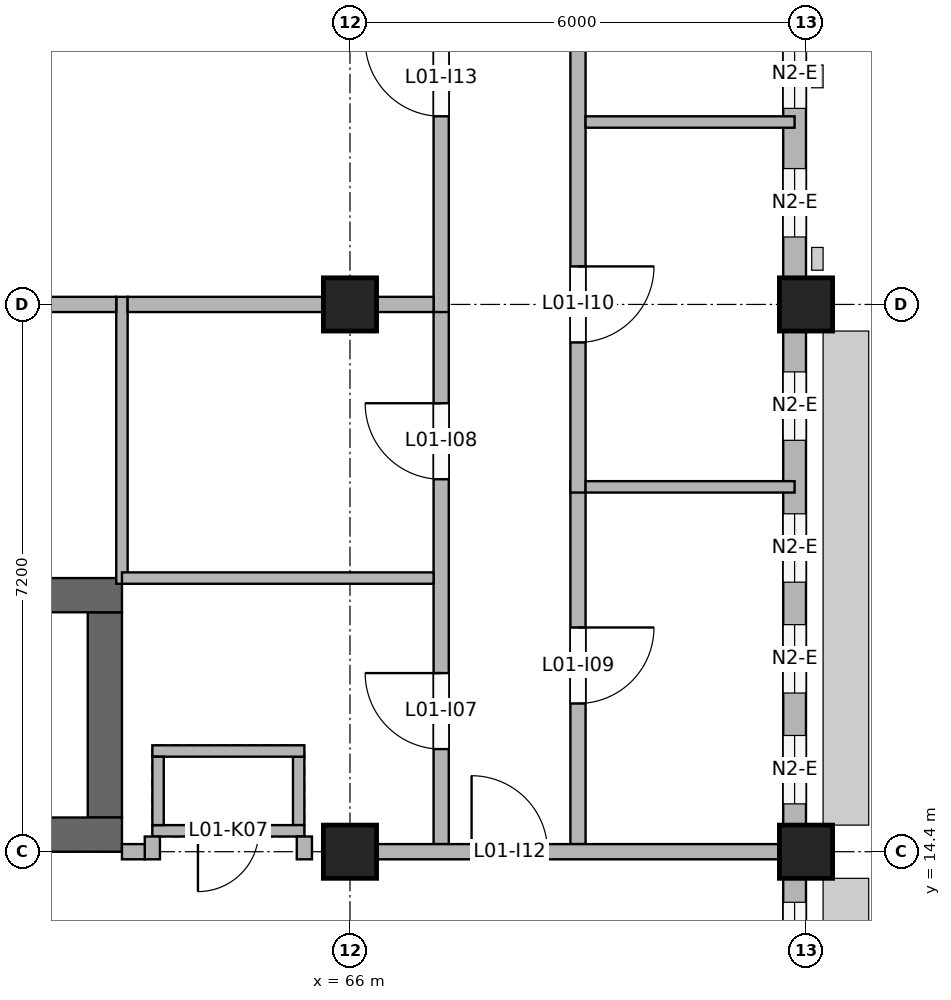
"""IFC4 building model, lengths in metres.
Left out: names, types, materials, properties, quantities, classifications, styles, units other than length and angle.
Written with IfcOpenShell. Run it as: python <this file> out.ifc"""

import sys

from ifc_helpers import new_model, si_unit, direction, frame, frame_2d, origin, origin_2d, place, context, subcontext, project, spatial, rectangle, extrude, element, fill, save


model = new_model("IFC4")
c1 = context("Model", 3, precision=1e-05, world=origin(), true_north=direction((0.0, 1.0)))
c2 = subcontext(c1, "Body", "Model", "MODEL_VIEW")
j1 = project(units=[si_unit("LENGTHUNIT", "METRE"), si_unit("PLANEANGLEUNIT", "RADIAN")], contexts=[c1])
p1 = place(None, origin())
s1 = spatial("IfcSite", under=j1, at=p1, CompositionType="ELEMENT")
p2 = place(p1, origin())
s2 = spatial("IfcBuilding", under=s1, at=p2, CompositionType="ELEMENT")
p3 = place(p2, frame((0.0, 0.0, 4.2)))
s3 = spatial("IfcBuildingStorey", under=s2, at=p3, CompositionType="ELEMENT", Elevation=4.2)
p4 = place(p3, frame((60.0, 14.625, 0.0), z_axis=(0.0, 0.0, 1.0), x_axis=(1.0, 0.0, 0.0)))
e1 = element("IfcWall", 1, at=p4, inside=s3, PredefinedType="SHEAR", context=c2, shape_type="SweptSolid", body=[
    extrude(rectangle(XDim=3.0, YDim=0.45, at=frame_2d((1.5, 0.0))), origin(), (0.0, 0.0, 1.0), 4.2),
])
p5 = place(p4, frame((0.95, 0.0, 0.0)))
e2 = element("IfcOpeningElement", 2, at=p5, cuts=e1, PredefinedType="OPENING", context=c2, shape_type="SweptSolid", body=[
    extrude(rectangle(XDim=1.1, YDim=2.1, at=frame_2d((0.55, 1.05))), frame((0.0, 0.235, 0.0), z_axis=(0.0, -1.0, 0.0), x_axis=(1.0, 0.0, 0.0)), (0.0, 0.0, 1.0), 0.47),
])
p6 = place(p3, frame((60.0, 17.775, 0.0), z_axis=(0.0, 0.0, 1.0), x_axis=(1.0, 0.0, 0.0)))
e3 = element("IfcWall", 3, at=p6, inside=s3, PredefinedType="SHEAR", context=c2, shape_type="SweptSolid", body=[
    extrude(rectangle(XDim=3.0, YDim=0.45, at=frame_2d((1.5, 0.0))), origin(), (0.0, 0.0, 1.0), 4.2),
])
p7 = place(p3, frame((62.775, 14.85, 0.0), z_axis=(0.0, 0.0, 1.0), x_axis=(0.0, 1.0, 0.0)))
e4 = element("IfcWall", 4, at=p7, inside=s3, PredefinedType="SHEAR", context=c2, shape_type="SweptSolid", body=[
    extrude(rectangle(XDim=2.7, YDim=0.45, at=frame_2d((1.35, 0.0))), origin(), (0.0, 0.0, 1.0), 4.2),
])
p8 = place(p3, frame((63.4, 14.675, 0.0), z_axis=(0.0, 0.0, 1.0), x_axis=(1.0, 0.0, 0.0)))
e5 = element("IfcWall", 5, at=p8, inside=s3, PredefinedType="SOLIDWALL", context=c2, shape_type="SweptSolid", body=[
    extrude(rectangle(XDim=2.0, YDim=0.15, at=frame_2d((1.0, 0.0))), origin(), (0.0, 0.0, 1.0), 4.2),
])
p9 = place(p8, frame((0.6, 0.0, 0.0)))
e6 = element("IfcOpeningElement", 6, at=p9, cuts=e5, PredefinedType="OPENING", context=c2, shape_type="SweptSolid", body=[
    extrude(rectangle(XDim=0.8, YDim=2.1, at=frame_2d((0.4, 1.05))), frame((0.0, 0.085, 0.0), z_axis=(0.0, -1.0, 0.0), x_axis=(1.0, 0.0, 0.0)), (0.0, 0.0, 1.0), 0.17),
])
p10 = place(p3, frame((63.4, 15.725, 0.0), z_axis=(0.0, 0.0, 1.0), x_axis=(1.0, 0.0, 0.0)))
e7 = element("IfcWall", 7, at=p10, inside=s3, PredefinedType="SOLIDWALL", context=c2, shape_type="SweptSolid", body=[
    extrude(rectangle(XDim=2.0, YDim=0.15, at=frame_2d((1.0, 0.0))), origin(), (0.0, 0.0, 1.0), 4.2),
])
for number, where, z_axis, x_axis in (
    (8, (63.475, 14.75, 0.0), (0.0, 0.0, 1.0), (0.0, 1.0, 0.0)),
    (9, (65.325, 14.75, 0.0), (0.0, 0.0, 1.0), (0.0, 1.0, 0.0)),
):
    element("IfcWall", number, at=place(p3, frame(where, z_axis=z_axis, x_axis=x_axis)), inside=s3, PredefinedType="SOLIDWALL", context=c2, shape_type="SweptSolid", body=[
        extrude(rectangle(XDim=0.9, YDim=0.15, at=frame_2d((0.45, 0.0))), origin(), (0.0, 0.0, 1.0), 4.2),
    ])
for number, where, z_axis, x_axis in (
    (10, (66.0, 14.4, 0.0), (0.0, 0.0, 1.0), (1.0, 0.0, 0.0)),
    (11, (72.0, 14.4, 0.0), (0.0, 0.0, 1.0), (1.0, 0.0, 0.0)),
    (12, (66.0, 21.6, 0.0), (0.0, 0.0, 1.0), (1.0, 0.0, 0.0)),
    (13, (72.0, 21.6, 0.0), (0.0, 0.0, 1.0), (1.0, 0.0, 0.0)),
):
    element("IfcColumn", number, at=place(p3, frame(where, z_axis=z_axis, x_axis=x_axis)), inside=s3, PredefinedType="COLUMN", context=c2, shape_type="SweptSolid", body=[
        extrude(rectangle(XDim=0.7, YDim=0.7, at=origin_2d()), origin(), (0.0, 0.0, 1.0), 3.95),
    ])
p11 = place(p3, frame((71.85, 7.2, 0.0), z_axis=(0.0, 0.0, 1.0), x_axis=(0.0, 1.0, 0.0)))
e14 = element("IfcWall", 14, at=p11, inside=s3, PredefinedType="SOLIDWALL", context=c2, shape_type="SweptSolid", body=[
    extrude(rectangle(XDim=6.85, YDim=0.3, at=frame_2d((3.425, 0.0))), origin(), (0.0, 0.0, 1.0), 3.05),
])
p12 = place(p11, frame((5.635, 0.0, 0.9)))
e15 = element("IfcOpeningElement", 15, at=p12, cuts=e14, PredefinedType="OPENING", context=c2, shape_type="SweptSolid", body=[
    extrude(rectangle(XDim=0.9, YDim=1.2, at=frame_2d((0.45, 0.6))), frame((0.0, 0.16, 0.0), z_axis=(0.0, -1.0, 0.0), x_axis=(1.0, 0.0, 0.0)), (0.0, 0.0, 1.0), 0.32),
])
p13 = place(p3, frame((71.85, 14.75, 0.0), z_axis=(0.0, 0.0, 1.0), x_axis=(0.0, 1.0, 0.0)))
e16 = element("IfcWall", 16, at=p13, inside=s3, PredefinedType="SOLIDWALL", context=c2, shape_type="SweptSolid", body=[
    extrude(rectangle(XDim=6.5, YDim=0.3, at=frame_2d((3.25, 0.0))), origin(), (0.0, 0.0, 1.0), 3.05),
])
p14 = place(p13, frame((0.279, 0.0, 0.9)))
e17 = element("IfcOpeningElement", 17, at=p14, cuts=e16, PredefinedType="OPENING", context=c2, shape_type="SweptSolid", body=[
    extrude(rectangle(XDim=0.9, YDim=1.2, at=frame_2d((0.45, 0.6))), frame((0.0, 0.16, 0.0), z_axis=(0.0, -1.0, 0.0), x_axis=(1.0, 0.0, 0.0)), (0.0, 0.0, 1.0), 0.32),
])
p15 = place(p13, frame((1.738, 0.0, 0.9)))
e18 = element("IfcOpeningElement", 18, at=p15, cuts=e16, PredefinedType="OPENING", context=c2, shape_type="SweptSolid", body=[
    extrude(rectangle(XDim=0.9, YDim=1.2, at=frame_2d((0.45, 0.6))), frame((0.0, 0.16, 0.0), z_axis=(0.0, -1.0, 0.0), x_axis=(1.0, 0.0, 0.0)), (0.0, 0.0, 1.0), 0.32),
])
p16 = place(p13, frame((3.196, 0.0, 0.9)))
e19 = element("IfcOpeningElement", 19, at=p16, cuts=e16, PredefinedType="OPENING", context=c2, shape_type="SweptSolid", body=[
    extrude(rectangle(XDim=0.9, YDim=1.2, at=frame_2d((0.45, 0.6))), frame((0.0, 0.16, 0.0), z_axis=(0.0, -1.0, 0.0), x_axis=(1.0, 0.0, 0.0)), (0.0, 0.0, 1.0), 0.32),
])
p17 = place(p13, frame((5.062, 0.0, 0.9)))
e20 = element("IfcOpeningElement", 20, at=p17, cuts=e16, PredefinedType="OPENING", context=c2, shape_type="SweptSolid", body=[
    extrude(rectangle(XDim=0.9, YDim=1.2, at=frame_2d((0.45, 0.6))), frame((0.0, 0.16, 0.0), z_axis=(0.0, -1.0, 0.0), x_axis=(1.0, 0.0, 0.0)), (0.0, 0.0, 1.0), 0.32),
])
p18 = place(p3, frame((71.85, 21.95, 0.0), z_axis=(0.0, 0.0, 1.0), x_axis=(0.0, 1.0, 0.0)))
e21 = element("IfcWall", 21, at=p18, inside=s3, PredefinedType="SOLIDWALL", context=c2, shape_type="SweptSolid", body=[
    extrude(rectangle(XDim=5.45, YDim=0.3, at=frame_2d((2.725, 0.0))), origin(), (0.0, 0.0, 1.0), 3.75),
])
p19 = place(p18, frame((0.538, 0.0, 0.9)))
e22 = element("IfcOpeningElement", 22, at=p19, cuts=e21, PredefinedType="OPENING", context=c2, shape_type="SweptSolid", body=[
    extrude(rectangle(XDim=0.9, YDim=1.2, at=frame_2d((0.45, 0.6))), frame((0.0, 0.16, 0.0), z_axis=(0.0, -1.0, 0.0), x_axis=(1.0, 0.0, 0.0)), (0.0, 0.0, 1.0), 0.32),
])
p20 = place(p18, frame((2.229, 0.0, 0.9)))
e23 = element("IfcOpeningElement", 23, at=p20, cuts=e21, PredefinedType="OPENING", context=c2, shape_type="SweptSolid", body=[
    extrude(rectangle(XDim=0.9, YDim=1.2, at=frame_2d((0.45, 0.6))), frame((0.0, 0.16, 0.0), z_axis=(0.0, -1.0, 0.0), x_axis=(1.0, 0.0, 0.0)), (0.0, 0.0, 1.0), 0.32),
])
p21 = place(p18, frame((3.337, 0.0, 0.9)))
e24 = element("IfcOpeningElement", 24, at=p21, cuts=e21, PredefinedType="OPENING", context=c2, shape_type="SweptSolid", body=[
    extrude(rectangle(XDim=0.9, YDim=1.2, at=frame_2d((0.45, 0.6))), frame((0.0, 0.16, 0.0), z_axis=(0.0, -1.0, 0.0), x_axis=(1.0, 0.0, 0.0)), (0.0, 0.0, 1.0), 0.32),
])
p22 = place(p18, frame((4.446, 0.0, 0.9)))
e25 = element("IfcOpeningElement", 25, at=p22, cuts=e21, PredefinedType="OPENING", context=c2, shape_type="SweptSolid", body=[
    extrude(rectangle(XDim=0.9, YDim=1.2, at=frame_2d((0.45, 0.6))), frame((0.0, 0.16, 0.0), z_axis=(0.0, -1.0, 0.0), x_axis=(1.0, 0.0, 0.0)), (0.0, 0.0, 1.0), 0.32),
])
p23 = place(p3, frame((63.0, 17.925, 0.0), z_axis=(0.0, 0.0, 1.0), x_axis=(0.0, 1.0, 0.0)))
e26 = element("IfcWall", 26, at=p23, inside=s3, PredefinedType="PARTITIONING", context=c2, shape_type="SweptSolid", body=[
    extrude(rectangle(XDim=3.775, YDim=0.15, at=frame_2d((1.887, 0.0))), origin(), (0.0, 0.0, 1.0), 2.55),
])
for number, where, z_axis, x_axis in (
    (27, (63.4, 14.3, 0.0), (0.0, 0.0, 1.0), (0.0, 1.0, 0.0)),
    (28, (65.4, 14.3, 0.0), (0.0, 0.0, 1.0), (0.0, 1.0, 0.0)),
):
    element("IfcWall", number, at=place(p3, frame(where, z_axis=z_axis, x_axis=x_axis)), inside=s3, PredefinedType="PARTITIONING", context=c2, shape_type="SweptSolid", body=[
        extrude(rectangle(XDim=0.3, YDim=0.2, at=frame_2d((0.15, 0.0))), origin(), (0.0, 0.0, 1.0), 3.15),
    ])
p24 = place(p3, frame((67.2, 14.5, 0.0), z_axis=(0.0, 0.0, 1.0), x_axis=(0.0, 1.0, 0.0)))
e29 = element("IfcWall", 29, at=p24, inside=s3, PredefinedType="PARTITIONING", context=c2, shape_type="SweptSolid", body=[
    extrude(rectangle(XDim=7.2, YDim=0.2, at=frame_2d((3.6, 0.0))), origin(), (0.0, 0.0, 1.0), 2.55),
])
p25 = place(p24, frame((1.25, 0.0, 0.0)))
e30 = element("IfcOpeningElement", 30, at=p25, cuts=e29, PredefinedType="OPENING", context=c2, shape_type="SweptSolid", body=[
    extrude(rectangle(XDim=1.0, YDim=2.1, at=frame_2d((0.5, 1.05))), frame((0.0, 0.11, 0.0), z_axis=(0.0, -1.0, 0.0), x_axis=(1.0, 0.0, 0.0)), (0.0, 0.0, 1.0), 0.22),
])
p26 = place(p24, frame((4.8, 0.0, 0.0)))
e31 = element("IfcOpeningElement", 31, at=p26, cuts=e29, PredefinedType="OPENING", context=c2, shape_type="SweptSolid", body=[
    extrude(rectangle(XDim=1.0, YDim=2.1, at=frame_2d((0.5, 1.05))), frame((0.0, 0.11, 0.0), z_axis=(0.0, -1.0, 0.0), x_axis=(1.0, 0.0, 0.0)), (0.0, 0.0, 1.0), 0.22),
])
p27 = place(p3, frame((67.2, 21.5, 0.0), z_axis=(0.0, 0.0, 1.0), x_axis=(0.0, 1.0, 0.0)))
e32 = element("IfcWall", 32, at=p27, inside=s3, PredefinedType="PARTITIONING", context=c2, shape_type="SweptSolid", body=[
    extrude(rectangle(XDim=6.05, YDim=0.2, at=frame_2d((3.025, 0.0))), origin(), (0.0, 0.0, 1.0), 2.55),
])
p28 = place(p27, frame((2.575, 0.0, 0.0)))
e33 = element("IfcOpeningElement", 33, at=p28, cuts=e32, PredefinedType="OPENING", context=c2, shape_type="SweptSolid", body=[
    extrude(rectangle(XDim=1.0, YDim=2.1, at=frame_2d((0.5, 1.05))), frame((0.0, 0.11, 0.0), z_axis=(0.0, -1.0, 0.0), x_axis=(1.0, 0.0, 0.0)), (0.0, 0.0, 1.0), 0.22),
])
p29 = place(p3, frame((69.0, 14.5, 0.0), z_axis=(0.0, 0.0, 1.0), x_axis=(0.0, 1.0, 0.0)))
e34 = element("IfcWall", 34, at=p29, inside=s3, PredefinedType="PARTITIONING", context=c2, shape_type="SweptSolid", body=[
    extrude(rectangle(XDim=4.775, YDim=0.2, at=frame_2d((2.387, 0.0))), origin(), (0.0, 0.0, 1.0), 3.15),
])
p30 = place(p29, frame((1.85, 0.0, 0.0)))
e35 = element("IfcOpeningElement", 35, at=p30, cuts=e34, PredefinedType="OPENING", context=c2, shape_type="SweptSolid", body=[
    extrude(rectangle(XDim=1.0, YDim=2.1, at=frame_2d((0.5, 1.05))), frame((0.0, 0.11, 0.0), z_axis=(0.0, -1.0, 0.0), x_axis=(1.0, 0.0, 0.0)), (0.0, 0.0, 1.0), 0.22),
])
p31 = place(p3, frame((69.0, 19.125, 0.0), z_axis=(0.0, 0.0, 1.0), x_axis=(0.0, 1.0, 0.0)))
e36 = element("IfcWall", 36, at=p31, inside=s3, PredefinedType="PARTITIONING", context=c2, shape_type="SweptSolid", body=[
    extrude(rectangle(XDim=8.425, YDim=0.2, at=frame_2d((4.212, 0.0))), origin(), (0.0, 0.0, 1.0), 2.55),
])
p32 = place(p31, frame((1.975, 0.0, 0.0)))
e37 = element("IfcOpeningElement", 37, at=p32, cuts=e36, PredefinedType="OPENING", context=c2, shape_type="SweptSolid", body=[
    extrude(rectangle(XDim=1.0, YDim=2.1, at=frame_2d((0.5, 1.05))), frame((0.0, 0.11, 0.0), z_axis=(0.0, -1.0, 0.0), x_axis=(1.0, 0.0, 0.0)), (0.0, 0.0, 1.0), 0.22),
])
p33 = place(p31, frame((6.15, 0.0, 0.0)))
e38 = element("IfcOpeningElement", 38, at=p33, cuts=e36, PredefinedType="OPENING", context=c2, shape_type="SweptSolid", body=[
    extrude(rectangle(XDim=1.0, YDim=2.1, at=frame_2d((0.5, 1.05))), frame((0.0, 0.11, 0.0), z_axis=(0.0, -1.0, 0.0), x_axis=(1.0, 0.0, 0.0)), (0.0, 0.0, 1.0), 0.22),
])
p34 = place(p3, frame((63.0, 14.4, 0.0), z_axis=(0.0, 0.0, 1.0), x_axis=(1.0, 0.0, 0.0)))
e39 = element("IfcWall", 39, at=p34, inside=s3, PredefinedType="PARTITIONING", context=c2, shape_type="SweptSolid", body=[
    extrude(rectangle(XDim=0.3, YDim=0.2, at=frame_2d((0.15, 0.0))), origin(), (0.0, 0.0, 1.0), 3.15),
])
p35 = place(p3, frame((66.35, 14.4, 0.0), z_axis=(0.0, 0.0, 1.0), x_axis=(1.0, 0.0, 0.0)))
e40 = element("IfcWall", 40, at=p35, inside=s3, PredefinedType="PARTITIONING", context=c2, shape_type="SweptSolid", body=[
    extrude(rectangle(XDim=5.3, YDim=0.2, at=frame_2d((2.65, 0.0))), origin(), (0.0, 0.0, 1.0), 3.15),
])
p36 = place(p35, frame((1.25, 0.0, 0.0)))
e41 = element("IfcOpeningElement", 41, at=p36, cuts=e40, PredefinedType="OPENING", context=c2, shape_type="SweptSolid", body=[
    extrude(rectangle(XDim=1.0, YDim=2.1, at=frame_2d((0.5, 1.05))), frame((0.0, 0.11, 0.0), z_axis=(0.0, -1.0, 0.0), x_axis=(1.0, 0.0, 0.0)), (0.0, 0.0, 1.0), 0.22),
])
p37 = place(p3, frame((63.0, 18.0, 0.0), z_axis=(0.0, 0.0, 1.0), x_axis=(1.0, 0.0, 0.0)))
e42 = element("IfcWall", 42, at=p37, inside=s3, PredefinedType="PARTITIONING", context=c2, shape_type="SweptSolid", body=[
    extrude(rectangle(XDim=4.1, YDim=0.15, at=frame_2d((2.05, 0.0))), origin(), (0.0, 0.0, 1.0), 3.05),
])
p38 = place(p3, frame((69.1, 19.2, 0.0), z_axis=(0.0, 0.0, 1.0), x_axis=(1.0, 0.0, 0.0)))
e43 = element("IfcWall", 43, at=p38, inside=s3, PredefinedType="PARTITIONING", context=c2, shape_type="SweptSolid", body=[
    extrude(rectangle(XDim=2.75, YDim=0.15, at=frame_2d((1.375, 0.0))), origin(), (0.0, 0.0, 1.0), 3.05),
])
p39 = place(p3, frame((60.15, 21.6, 0.0), z_axis=(0.0, 0.0, 1.0), x_axis=(1.0, 0.0, 0.0)))
e44 = element("IfcWall", 44, at=p39, inside=s3, PredefinedType="PARTITIONING", context=c2, shape_type="SweptSolid", body=[
    extrude(rectangle(XDim=2.775, YDim=0.2, at=frame_2d((1.388, 0.0))), origin(), (0.0, 0.0, 1.0), 2.55),
])
p40 = place(p3, frame((63.075, 21.6, 0.0), z_axis=(0.0, 0.0, 1.0), x_axis=(1.0, 0.0, 0.0)))
e45 = element("IfcWall", 45, at=p40, inside=s3, PredefinedType="PARTITIONING", context=c2, shape_type="SweptSolid", body=[
    extrude(rectangle(XDim=4.025, YDim=0.2, at=frame_2d((2.013, 0.0))), origin(), (0.0, 0.0, 1.0), 2.55),
])
p41 = place(p3, frame((69.1, 24.0, 0.0), z_axis=(0.0, 0.0, 1.0), x_axis=(1.0, 0.0, 0.0)))
e46 = element("IfcWall", 46, at=p41, inside=s3, PredefinedType="PARTITIONING", context=c2, shape_type="SweptSolid", body=[
    extrude(rectangle(XDim=2.75, YDim=0.15, at=frame_2d((1.375, 0.0))), origin(), (0.0, 0.0, 1.0), 3.75),
])
p42 = place(p12, origin())
e47 = element("IfcWindow", 47, at=p42, inside=s3, PartitioningType="SINGLE_PANEL", PredefinedType="WINDOW", context=c2, shape_type="SweptSolid", body=[
    extrude(rectangle(XDim=0.9, YDim=1.2, at=frame_2d((0.45, 0.6))), frame((0.0, 0.03, 0.0), z_axis=(0.0, -1.0, 0.0), x_axis=(1.0, 0.0, 0.0)), (0.0, 0.0, 1.0), 0.06),
])
fill(e15, e47)
p43 = place(p14, origin())
e48 = element("IfcWindow", 48, at=p43, inside=s3, PartitioningType="SINGLE_PANEL", PredefinedType="WINDOW", context=c2, shape_type="SweptSolid", body=[
    extrude(rectangle(XDim=0.9, YDim=1.2, at=frame_2d((0.45, 0.6))), frame((0.0, 0.03, 0.0), z_axis=(0.0, -1.0, 0.0), x_axis=(1.0, 0.0, 0.0)), (0.0, 0.0, 1.0), 0.06),
])
fill(e17, e48)
p44 = place(p15, origin())
e49 = element("IfcWindow", 49, at=p44, inside=s3, PartitioningType="SINGLE_PANEL", PredefinedType="WINDOW", context=c2, shape_type="SweptSolid", body=[
    extrude(rectangle(XDim=0.9, YDim=1.2, at=frame_2d((0.45, 0.6))), frame((0.0, 0.03, 0.0), z_axis=(0.0, -1.0, 0.0), x_axis=(1.0, 0.0, 0.0)), (0.0, 0.0, 1.0), 0.06),
])
fill(e18, e49)
p45 = place(p16, origin())
e50 = element("IfcWindow", 50, at=p45, inside=s3, PartitioningType="SINGLE_PANEL", PredefinedType="WINDOW", context=c2, shape_type="SweptSolid", body=[
    extrude(rectangle(XDim=0.9, YDim=1.2, at=frame_2d((0.45, 0.6))), frame((0.0, 0.03, 0.0), z_axis=(0.0, -1.0, 0.0), x_axis=(1.0, 0.0, 0.0)), (0.0, 0.0, 1.0), 0.06),
])
fill(e19, e50)
p46 = place(p17, origin())
e51 = element("IfcWindow", 51, at=p46, inside=s3, PartitioningType="SINGLE_PANEL", PredefinedType="WINDOW", context=c2, shape_type="SweptSolid", body=[
    extrude(rectangle(XDim=0.9, YDim=1.2, at=frame_2d((0.45, 0.6))), frame((0.0, 0.03, 0.0), z_axis=(0.0, -1.0, 0.0), x_axis=(1.0, 0.0, 0.0)), (0.0, 0.0, 1.0), 0.06),
])
fill(e20, e51)
p47 = place(p19, origin())
e52 = element("IfcWindow", 52, at=p47, inside=s3, PartitioningType="SINGLE_PANEL", PredefinedType="WINDOW", context=c2, shape_type="SweptSolid", body=[
    extrude(rectangle(XDim=0.9, YDim=1.2, at=frame_2d((0.45, 0.6))), frame((0.0, 0.03, 0.0), z_axis=(0.0, -1.0, 0.0), x_axis=(1.0, 0.0, 0.0)), (0.0, 0.0, 1.0), 0.06),
])
fill(e22, e52)
p48 = place(p20, origin())
e53 = element("IfcWindow", 53, at=p48, inside=s3, PartitioningType="SINGLE_PANEL", PredefinedType="WINDOW", context=c2, shape_type="SweptSolid", body=[
    extrude(rectangle(XDim=0.9, YDim=1.2, at=frame_2d((0.45, 0.6))), frame((0.0, 0.03, 0.0), z_axis=(0.0, -1.0, 0.0), x_axis=(1.0, 0.0, 0.0)), (0.0, 0.0, 1.0), 0.06),
])
fill(e23, e53)
p49 = place(p9, frame((0.8, 0.0, 0.0), z_axis=(0.0, 0.0, 1.0), x_axis=(-1.0, 0.0, 0.0)))
e54 = element("IfcDoor", 54, at=p49, inside=s3, OperationType="SINGLE_SWING_RIGHT", PredefinedType="DOOR", context=c2, shape_type="SweptSolid", body=[
    extrude(rectangle(XDim=0.8, YDim=2.1, at=frame_2d((0.4, 1.05))), frame((0.0, 0.025, 0.0), z_axis=(0.0, -1.0, 0.0), x_axis=(1.0, 0.0, 0.0)), (0.0, 0.0, 1.0), 0.05),
])
fill(e6, e54)
p50 = place(p25, origin())
e55 = element("IfcDoor", 55, at=p50, inside=s3, OperationType="SINGLE_SWING_RIGHT", PredefinedType="DOOR", context=c2, shape_type="SweptSolid", body=[
    extrude(rectangle(XDim=1.0, YDim=2.1, at=frame_2d((0.5, 1.05))), frame((0.0, 0.025, 0.0), z_axis=(0.0, -1.0, 0.0), x_axis=(1.0, 0.0, 0.0)), (0.0, 0.0, 1.0), 0.05),
])
fill(e30, e55)
p51 = place(p26, origin())
e56 = element("IfcDoor", 56, at=p51, inside=s3, OperationType="SINGLE_SWING_RIGHT", PredefinedType="DOOR", context=c2, shape_type="SweptSolid", body=[
    extrude(rectangle(XDim=1.0, YDim=2.1, at=frame_2d((0.5, 1.05))), frame((0.0, 0.025, 0.0), z_axis=(0.0, -1.0, 0.0), x_axis=(1.0, 0.0, 0.0)), (0.0, 0.0, 1.0), 0.05),
])
fill(e31, e56)
p52 = place(p30, frame((1.0, 0.0, 0.0), z_axis=(0.0, 0.0, 1.0), x_axis=(-1.0, 0.0, 0.0)))
e57 = element("IfcDoor", 57, at=p52, inside=s3, OperationType="SINGLE_SWING_LEFT", PredefinedType="DOOR", context=c2, shape_type="SweptSolid", body=[
    extrude(rectangle(XDim=1.0, YDim=2.1, at=frame_2d((0.5, 1.05))), frame((0.0, 0.025, 0.0), z_axis=(0.0, -1.0, 0.0), x_axis=(1.0, 0.0, 0.0)), (0.0, 0.0, 1.0), 0.05),
])
fill(e35, e57)
p53 = place(p32, frame((1.0, 0.0, 0.0), z_axis=(0.0, 0.0, 1.0), x_axis=(-1.0, 0.0, 0.0)))
e58 = element("IfcDoor", 58, at=p53, inside=s3, OperationType="SINGLE_SWING_LEFT", PredefinedType="DOOR", context=c2, shape_type="SweptSolid", body=[
    extrude(rectangle(XDim=1.0, YDim=2.1, at=frame_2d((0.5, 1.05))), frame((0.0, 0.025, 0.0), z_axis=(0.0, -1.0, 0.0), x_axis=(1.0, 0.0, 0.0)), (0.0, 0.0, 1.0), 0.05),
])
fill(e37, e58)
p54 = place(p36, origin())
e59 = element("IfcDoor", 59, at=p54, inside=s3, OperationType="SINGLE_SWING_LEFT", PredefinedType="DOOR", context=c2, shape_type="SweptSolid", body=[
    extrude(rectangle(XDim=1.0, YDim=2.1, at=frame_2d((0.5, 1.05))), frame((0.0, 0.025, 0.0), z_axis=(0.0, -1.0, 0.0), x_axis=(1.0, 0.0, 0.0)), (0.0, 0.0, 1.0), 0.05),
])
fill(e41, e59)
p55 = place(p28, origin())
e60 = element("IfcDoor", 60, at=p55, inside=s3, OperationType="SINGLE_SWING_RIGHT", PredefinedType="DOOR", context=c2, shape_type="SweptSolid", body=[
    extrude(rectangle(XDim=1.0, YDim=2.1, at=frame_2d((0.5, 1.05))), frame((0.0, 0.025, 0.0), z_axis=(0.0, -1.0, 0.0), x_axis=(1.0, 0.0, 0.0)), (0.0, 0.0, 1.0), 0.05),
])
fill(e33, e60)
save(model, sys.argv[1])
